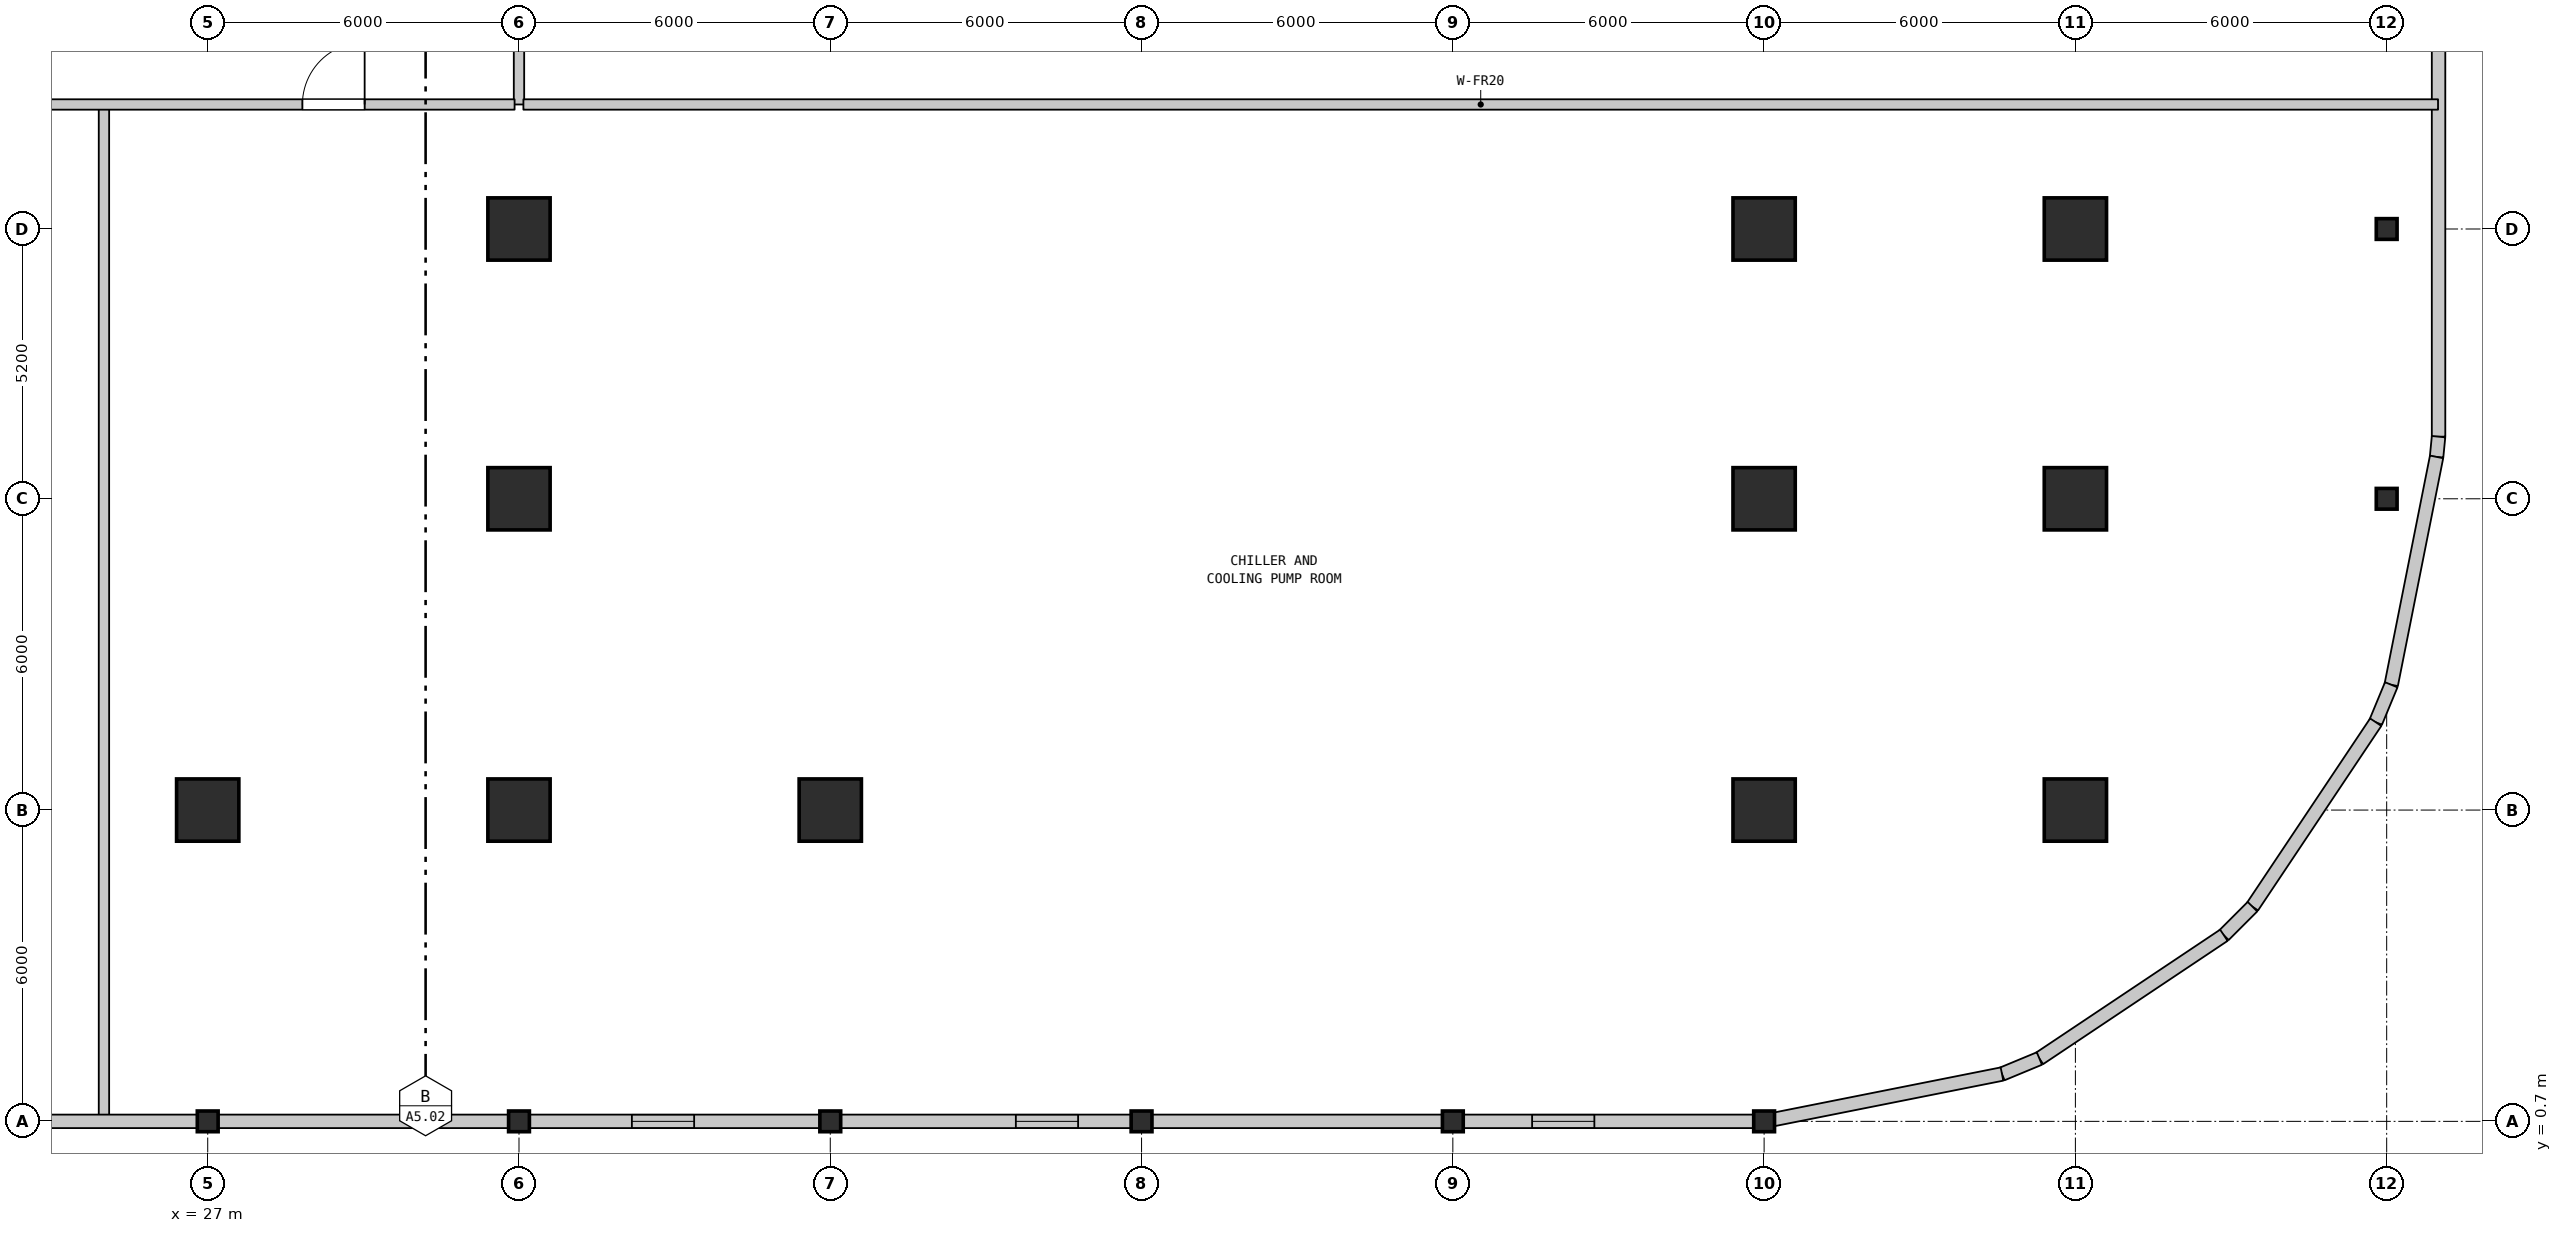
"""IFC4 building model, lengths in metres.
Left out: names, types, materials, properties, quantities, classifications, styles, units other than length and angle.
Written with IfcOpenShell. Run it as: python <this file> out.ifc"""

import sys

from ifc_helpers import new_model, si_unit, direction, frame, frame_2d, origin, origin_2d, place, context, subcontext, project, spatial, rectangle, i_section, extrude, element, fill, save


model = new_model("IFC4")
c1 = context("Model", 3, precision=1e-05, world=origin(), true_north=direction((0.0, 1.0)))
c2 = subcontext(c1, "Body", "Model", "MODEL_VIEW")
j1 = project(units=[si_unit("LENGTHUNIT", "METRE"), si_unit("PLANEANGLEUNIT", "RADIAN")], contexts=[c1])
p1 = place(None, origin())
s1 = spatial("IfcSite", under=j1, at=p1, CompositionType="ELEMENT")
p2 = place(p1, origin())
s2 = spatial("IfcBuilding", under=s1, at=p2, CompositionType="ELEMENT")
p3 = place(p2, frame((0.0, 0.0, 61.0)))
s3 = spatial("IfcBuildingStorey", under=s2, at=p3, CompositionType="ELEMENT", Elevation=61.0)
p4 = place(p3, frame((27.0, 0.7, 0.0), z_axis=(0.0, 0.0, 1.0), x_axis=(1.0, 0.0, 0.0)))
e1 = element("IfcColumn", 1, at=p4, inside=s3, PredefinedType="COLUMN", context=c2, shape_type="SweptSolid", body=[
    extrude(i_section(OverallWidth=0.401, OverallDepth=0.399, WebThickness=0.025, FlangeThickness=0.04, FilletRadius=0.015, at=origin_2d()), origin(), (0.0, 0.0, 1.0), 4.6),
])
p5 = place(p3, frame((27.0, 6.7, 0.0), z_axis=(0.0, 0.0, 1.0), x_axis=(1.0, 0.0, 0.0)))
e2 = element("IfcColumn", 2, at=p5, inside=s3, PredefinedType="COLUMN", context=c2, shape_type="SweptSolid", body=[
    extrude(rectangle(XDim=1.2, YDim=1.2, at=origin_2d()), origin(), (0.0, 0.0, 1.0), 4.6),
])
p6 = place(p3, frame((33.0, 0.7, 0.0), z_axis=(0.0, 0.0, 1.0), x_axis=(1.0, 0.0, 0.0)))
e3 = element("IfcColumn", 3, at=p6, inside=s3, PredefinedType="COLUMN", context=c2, shape_type="SweptSolid", body=[
    extrude(i_section(OverallWidth=0.401, OverallDepth=0.399, WebThickness=0.025, FlangeThickness=0.04, FilletRadius=0.015, at=origin_2d()), origin(), (0.0, 0.0, 1.0), 4.6),
])
for number, where, z_axis, x_axis in (
    (4, (33.0, 6.7, 0.0), (0.0, 0.0, 1.0), (1.0, 0.0, 0.0)),
    (5, (33.0, 12.7, 0.0), (0.0, 0.0, 1.0), (1.0, 0.0, 0.0)),
    (6, (33.0, 17.9, 0.0), (0.0, 0.0, 1.0), (1.0, 0.0, 0.0)),
):
    element("IfcColumn", number, at=place(p3, frame(where, z_axis=z_axis, x_axis=x_axis)), inside=s3, PredefinedType="COLUMN", context=c2, shape_type="SweptSolid", body=[
        extrude(rectangle(XDim=1.2, YDim=1.2, at=origin_2d()), origin(), (0.0, 0.0, 1.0), 4.6),
    ])
p7 = place(p3, frame((39.0, 0.7, 0.0), z_axis=(0.0, 0.0, 1.0), x_axis=(1.0, 0.0, 0.0)))
e7 = element("IfcColumn", 7, at=p7, inside=s3, PredefinedType="COLUMN", context=c2, shape_type="SweptSolid", body=[
    extrude(i_section(OverallWidth=0.401, OverallDepth=0.399, WebThickness=0.025, FlangeThickness=0.04, FilletRadius=0.015, at=origin_2d()), origin(), (0.0, 0.0, 1.0), 4.6),
])
p8 = place(p3, frame((39.0, 6.7, 0.0), z_axis=(0.0, 0.0, 1.0), x_axis=(1.0, 0.0, 0.0)))
e8 = element("IfcColumn", 8, at=p8, inside=s3, PredefinedType="COLUMN", context=c2, shape_type="SweptSolid", body=[
    extrude(rectangle(XDim=1.2, YDim=1.2, at=origin_2d()), origin(), (0.0, 0.0, 1.0), 4.6),
])
for number, where, z_axis, x_axis in (
    (9, (45.0, 0.7, 0.0), (0.0, 0.0, 1.0), (1.0, 0.0, 0.0)),
    (10, (51.0, 0.7, 0.0), (0.0, 0.0, 1.0), (1.0, 0.0, 0.0)),
    (11, (57.0, 0.7, 0.0), (0.0, 0.0, 1.0), (1.0, 0.0, 0.0)),
):
    element("IfcColumn", number, at=place(p3, frame(where, z_axis=z_axis, x_axis=x_axis)), inside=s3, PredefinedType="COLUMN", context=c2, shape_type="SweptSolid", body=[
        extrude(i_section(OverallWidth=0.401, OverallDepth=0.399, WebThickness=0.025, FlangeThickness=0.04, FilletRadius=0.015, at=origin_2d()), origin(), (0.0, 0.0, 1.0), 4.6),
    ])
for number, where, z_axis, x_axis in (
    (12, (57.0, 6.7, 0.0), (0.0, 0.0, 1.0), (1.0, 0.0, 0.0)),
    (13, (57.0, 12.7, 0.0), (0.0, 0.0, 1.0), (1.0, 0.0, 0.0)),
    (14, (57.0, 17.9, 0.0), (0.0, 0.0, 1.0), (1.0, 0.0, 0.0)),
    (15, (63.0, 6.7, 0.0), (0.0, 0.0, 1.0), (1.0, 0.0, 0.0)),
    (16, (63.0, 12.7, 0.0), (0.0, 0.0, 1.0), (1.0, 0.0, 0.0)),
    (17, (63.0, 17.9, 0.0), (0.0, 0.0, 1.0), (1.0, 0.0, 0.0)),
):
    element("IfcColumn", number, at=place(p3, frame(where, z_axis=z_axis, x_axis=x_axis)), inside=s3, PredefinedType="COLUMN", context=c2, shape_type="SweptSolid", body=[
        extrude(rectangle(XDim=1.2, YDim=1.2, at=origin_2d()), origin(), (0.0, 0.0, 1.0), 4.6),
    ])
for number, where, z_axis, x_axis in (
    (18, (69.0, 12.7, 0.0), (0.0, 0.0, 1.0), (1.0, 0.0, 0.0)),
    (19, (69.0, 17.9, 0.0), (0.0, 0.0, 1.0), (1.0, 0.0, 0.0)),
):
    element("IfcColumn", number, at=place(p3, frame(where, z_axis=z_axis, x_axis=x_axis)), inside=s3, PredefinedType="COLUMN", context=c2, shape_type="SweptSolid", body=[
        extrude(i_section(OverallWidth=0.401, OverallDepth=0.399, WebThickness=0.025, FlangeThickness=0.04, FilletRadius=0.015, at=origin_2d()), origin(), (0.0, 0.0, 1.0), 4.6),
    ])
p9 = place(p3, frame((70.0, 30.7, 0.0), z_axis=(0.0, 0.0, 1.0), x_axis=(0.0, -1.0, 0.0)))
e20 = element("IfcWall", 20, at=p9, inside=s3, PredefinedType="STANDARD", context=c2, shape_type="SweptSolid", body=[
    extrude(rectangle(XDim=16.803, YDim=0.26, at=frame_2d((8.401, 0.0))), origin(), (0.0, 0.0, 1.0), 4.28),
])
p10 = place(p9, frame((4.251, 0.0, 1.1)))
e21 = element("IfcOpeningElement", 21, at=p10, cuts=e20, PredefinedType="OPENING", context=c2, shape_type="SweptSolid", body=[
    extrude(rectangle(XDim=1.2, YDim=1.4, at=frame_2d((0.6, 0.7))), frame((0.0, 0.14, 0.0), z_axis=(0.0, -1.0, 0.0), x_axis=(1.0, 0.0, 0.0)), (0.0, 0.0, 1.0), 0.28),
])
p11 = place(p3, frame((70.0, 13.897, 0.0), z_axis=(0.0, 0.0, 1.0), x_axis=(-0.09722041859, -0.995262874928, 0.0)))
e22 = element("IfcWall", 22, at=p11, inside=s3, PredefinedType="STANDARD", context=c2, shape_type="SweptSolid", body=[
    extrude(rectangle(XDim=0.392, YDim=0.26, at=frame_2d((0.196, 0.0))), origin(), (0.0, 0.0, 1.0), 4.28),
])
p12 = place(p3, frame((69.962, 13.507, 0.0), z_axis=(0.0, 0.0, 1.0), x_axis=(-0.195172473082, -0.980768935963, 0.0)))
e23 = element("IfcWall", 23, at=p12, inside=s3, PredefinedType="STANDARD", context=c2, shape_type="SweptSolid", body=[
    extrude(rectangle(XDim=4.478, YDim=0.26, at=frame_2d((2.239, 0.0))), origin(), (0.0, 0.0, 1.0), 4.28),
])
p13 = place(p3, frame((69.088, 9.115, 0.0), z_axis=(0.0, 0.0, 1.0), x_axis=(-0.382904338353, -0.923787999311, 0.0)))
e24 = element("IfcWall", 24, at=p13, inside=s3, PredefinedType="STANDARD", context=c2, shape_type="SweptSolid", body=[
    extrude(rectangle(XDim=0.781, YDim=0.26, at=frame_2d((0.39, 0.0))), origin(), (0.0, 0.0, 1.0), 4.28),
])
p14 = place(p3, frame((68.789, 8.394, 0.0), z_axis=(0.0, 0.0, 1.0), x_axis=(-0.555543000532, -0.831487807824, 0.0)))
e25 = element("IfcWall", 25, at=p14, inside=s3, PredefinedType="STANDARD", context=c2, shape_type="SweptSolid", body=[
    extrude(rectangle(XDim=4.277, YDim=0.26, at=frame_2d((2.138, 0.0))), origin(), (0.0, 0.0, 1.0), 4.28),
])
p15 = place(p3, frame((66.413, 4.838, 0.0), z_axis=(0.0, 0.0, 1.0), x_axis=(-0.707263446027, -0.706950081629, 0.0)))
e26 = element("IfcWall", 26, at=p15, inside=s3, PredefinedType="STANDARD", context=c2, shape_type="SweptSolid", body=[
    extrude(rectangle(XDim=0.779, YDim=0.26, at=frame_2d((0.39, 0.0))), origin(), (0.0, 0.0, 1.0), 4.28),
])
p16 = place(p3, frame((65.862, 4.287, 0.0), z_axis=(0.0, 0.0, 1.0), x_axis=(-0.831461438998, -0.55558246504, 0.0)))
e27 = element("IfcWall", 27, at=p16, inside=s3, PredefinedType="STANDARD", context=c2, shape_type="SweptSolid", body=[
    extrude(rectangle(XDim=4.277, YDim=0.26, at=frame_2d((2.139, 0.0))), origin(), (0.0, 0.0, 1.0), 4.28),
])
p17 = place(p3, frame((62.306, 1.911, 0.0), z_axis=(0.0, 0.0, 1.0), x_axis=(-0.923787999311, -0.382904338353, 0.0)))
e28 = element("IfcWall", 28, at=p17, inside=s3, PredefinedType="STANDARD", context=c2, shape_type="SweptSolid", body=[
    extrude(rectangle(XDim=0.781, YDim=0.26, at=frame_2d((0.39, 0.0))), origin(), (0.0, 0.0, 1.0), 4.28),
])
p18 = place(p3, frame((61.585, 1.612, 0.0), z_axis=(0.0, 0.0, 1.0), x_axis=(-0.980766859102, -0.19518290931, 0.0)))
e29 = element("IfcWall", 29, at=p18, inside=s3, PredefinedType="STANDARD", context=c2, shape_type="SweptSolid", body=[
    extrude(rectangle(XDim=4.478, YDim=0.26, at=frame_2d((2.239, 0.0))), origin(), (0.0, 0.0, 1.0), 4.28),
])
p19 = place(p3, frame((57.193, 0.738, 0.0), z_axis=(0.0, 0.0, 1.0), x_axis=(-0.995268759893, -0.097160154282, 0.0)))
e30 = element("IfcWall", 30, at=p19, inside=s3, PredefinedType="STANDARD", context=c2, shape_type="SweptSolid", body=[
    extrude(rectangle(XDim=0.392, YDim=0.26, at=frame_2d((0.196, 0.0))), origin(), (0.0, 0.0, 1.0), 4.28),
])
p20 = place(p3, frame((56.803, 0.7, 0.0), z_axis=(0.0, 0.0, 1.0), x_axis=(-1.0, 0.0, 0.0)))
e31 = element("IfcWall", 31, at=p20, inside=s3, PredefinedType="STANDARD", context=c2, shape_type="SweptSolid", body=[
    extrude(rectangle(XDim=5.803, YDim=0.26, at=frame_2d((2.901, 0.0))), origin(), (0.0, 0.0, 1.0), 3.78),
])
p21 = place(p20, frame((3.075, 0.0, 1.1)))
e32 = element("IfcOpeningElement", 32, at=p21, cuts=e31, PredefinedType="OPENING", context=c2, shape_type="SweptSolid", body=[
    extrude(rectangle(XDim=1.2, YDim=1.4, at=frame_2d((0.6, 0.7))), frame((0.0, 0.14, 0.0), z_axis=(0.0, -1.0, 0.0), x_axis=(1.0, 0.0, 0.0)), (0.0, 0.0, 1.0), 0.28),
])
p22 = place(p3, frame((25.0, 0.71, 0.0), z_axis=(0.0, 0.0, 1.0), x_axis=(0.0, 1.0, 0.0)))
e33 = element("IfcWall", 33, at=p22, inside=s3, PredefinedType="STANDARD", context=c2, shape_type="SweptSolid", body=[
    extrude(rectangle(XDim=19.59, YDim=0.2, at=frame_2d((9.795, 0.0))), origin(), (0.0, 0.0, 1.0), 4.28),
])
p23 = place(p3, frame((33.0, 20.3, 0.0), z_axis=(0.0, 0.0, 1.0), x_axis=(0.0, 1.0, 0.0)))
e34 = element("IfcWall", 34, at=p23, inside=s3, PredefinedType="STANDARD", context=c2, shape_type="SweptSolid", body=[
    extrude(rectangle(XDim=8.2, YDim=0.2, at=frame_2d((4.1, 0.0))), origin(), (0.0, 0.0, 1.0), 3.78),
])
p24 = place(p23, frame((4.6, 0.0, 0.0)))
e35 = element("IfcOpeningElement", 35, at=p24, cuts=e34, PredefinedType="OPENING", context=c2, shape_type="SweptSolid", body=[
    extrude(rectangle(XDim=1.2, YDim=2.2, at=frame_2d((0.6, 1.1))), frame((0.0, 0.11, 0.0), z_axis=(0.0, -1.0, 0.0), x_axis=(1.0, 0.0, 0.0)), (0.0, 0.0, 1.0), 0.22),
])
p25 = place(p3, frame((12.6, 20.3, 0.0), z_axis=(0.0, 0.0, 1.0), x_axis=(1.0, 0.0, 0.0)))
e36 = element("IfcWall", 36, at=p25, inside=s3, PredefinedType="STANDARD", context=c2, shape_type="SweptSolid", body=[
    extrude(rectangle(XDim=20.315, YDim=0.2, at=frame_2d((10.157, 0.0))), origin(), (0.0, 0.0, 1.0), 4.28),
])
p26 = place(p25, frame((6.8, 0.0, 0.0)))
e37 = element("IfcOpeningElement", 37, at=p26, cuts=e36, PredefinedType="OPENING", context=c2, shape_type="SweptSolid", body=[
    extrude(rectangle(XDim=1.2, YDim=2.2, at=frame_2d((0.6, 1.1))), frame((0.0, 0.11, 0.0), z_axis=(0.0, -1.0, 0.0), x_axis=(1.0, 0.0, 0.0)), (0.0, 0.0, 1.0), 0.22),
])
p27 = place(p25, frame((16.225, 0.0, 0.0)))
e38 = element("IfcOpeningElement", 38, at=p27, cuts=e36, PredefinedType="OPENING", context=c2, shape_type="SweptSolid", body=[
    extrude(rectangle(XDim=1.2, YDim=2.2, at=frame_2d((0.6, 1.1))), frame((0.0, 0.11, 0.0), z_axis=(0.0, -1.0, 0.0), x_axis=(1.0, 0.0, 0.0)), (0.0, 0.0, 1.0), 0.22),
])
p28 = place(p3, frame((33.085, 20.3, 0.0), z_axis=(0.0, 0.0, 1.0), x_axis=(1.0, 0.0, 0.0)))
e39 = element("IfcWall", 39, at=p28, inside=s3, PredefinedType="STANDARD", context=c2, shape_type="SweptSolid", body=[
    extrude(rectangle(XDim=36.905, YDim=0.2, at=frame_2d((18.453, 0.0))), origin(), (0.0, 0.0, 1.0), 4.28),
])
p29 = place(p3, frame((51.0, 0.7, 0.0), z_axis=(0.0, 0.0, 1.0), x_axis=(-1.0, 0.0, 0.0)))
e40 = element("IfcWall", 40, at=p29, inside=s3, PredefinedType="STANDARD", context=c2, shape_type="SweptSolid", body=[
    extrude(rectangle(XDim=6.0, YDim=0.26, at=frame_2d((3.0, 0.0))), origin(), (0.0, 0.0, 1.0), 4.28),
])
p30 = place(p3, frame((45.0, 0.7, 0.0), z_axis=(0.0, 0.0, 1.0), x_axis=(-1.0, 0.0, 0.0)))
e41 = element("IfcWall", 41, at=p30, inside=s3, PredefinedType="STANDARD", context=c2, shape_type="SweptSolid", body=[
    extrude(rectangle(XDim=18.0, YDim=0.26, at=frame_2d((9.0, 0.0))), origin(), (0.0, 0.0, 1.0), 3.78),
])
p31 = place(p30, frame((1.223, 0.0, 1.1)))
e42 = element("IfcOpeningElement", 42, at=p31, cuts=e41, PredefinedType="OPENING", context=c2, shape_type="SweptSolid", body=[
    extrude(rectangle(XDim=1.2, YDim=1.4, at=frame_2d((0.6, 0.7))), frame((0.0, 0.14, 0.0), z_axis=(0.0, -1.0, 0.0), x_axis=(1.0, 0.0, 0.0)), (0.0, 0.0, 1.0), 0.28),
])
p32 = place(p30, frame((8.624, 0.0, 1.1)))
e43 = element("IfcOpeningElement", 43, at=p32, cuts=e41, PredefinedType="OPENING", context=c2, shape_type="SweptSolid", body=[
    extrude(rectangle(XDim=1.2, YDim=1.4, at=frame_2d((0.6, 0.7))), frame((0.0, 0.14, 0.0), z_axis=(0.0, -1.0, 0.0), x_axis=(1.0, 0.0, 0.0)), (0.0, 0.0, 1.0), 0.28),
])
p33 = place(p3, frame((27.0, 0.7, 0.0), z_axis=(0.0, 0.0, 1.0), x_axis=(-1.0, 0.0, 0.0)))
e44 = element("IfcWall", 44, at=p33, inside=s3, PredefinedType="STANDARD", context=c2, shape_type="SweptSolid", body=[
    extrude(rectangle(XDim=4.0, YDim=0.26, at=frame_2d((2.0, 0.0))), origin(), (0.0, 0.0, 1.0), 4.28),
])
p34 = place(p21, origin())
e45 = element("IfcWindow", 45, at=p34, inside=s3, PartitioningType="SINGLE_PANEL", PredefinedType="WINDOW", context=c2, shape_type="SweptSolid", body=[
    extrude(rectangle(XDim=1.2, YDim=1.4, at=frame_2d((0.6, 0.7))), frame((0.0, 0.03, 0.0), z_axis=(0.0, -1.0, 0.0), x_axis=(1.0, 0.0, 0.0)), (0.0, 0.0, 1.0), 0.06),
])
fill(e32, e45)
p35 = place(p31, origin())
e46 = element("IfcWindow", 46, at=p35, inside=s3, PartitioningType="SINGLE_PANEL", PredefinedType="WINDOW", context=c2, shape_type="SweptSolid", body=[
    extrude(rectangle(XDim=1.2, YDim=1.4, at=frame_2d((0.6, 0.7))), frame((0.0, 0.03, 0.0), z_axis=(0.0, -1.0, 0.0), x_axis=(1.0, 0.0, 0.0)), (0.0, 0.0, 1.0), 0.06),
])
fill(e42, e46)
p36 = place(p32, origin())
e47 = element("IfcWindow", 47, at=p36, inside=s3, PartitioningType="SINGLE_PANEL", PredefinedType="WINDOW", context=c2, shape_type="SweptSolid", body=[
    extrude(rectangle(XDim=1.2, YDim=1.4, at=frame_2d((0.6, 0.7))), frame((0.0, 0.03, 0.0), z_axis=(0.0, -1.0, 0.0), x_axis=(1.0, 0.0, 0.0)), (0.0, 0.0, 1.0), 0.06),
])
fill(e43, e47)
p37 = place(p27, origin())
e48 = element("IfcDoor", 48, at=p37, inside=s3, OperationType="SINGLE_SWING_RIGHT", PredefinedType="DOOR", context=c2, shape_type="SweptSolid", body=[
    extrude(rectangle(XDim=1.2, YDim=2.2, at=frame_2d((0.6, 1.1))), frame((0.0, 0.025, 0.0), z_axis=(0.0, -1.0, 0.0), x_axis=(1.0, 0.0, 0.0)), (0.0, 0.0, 1.0), 0.05),
])
fill(e38, e48)
save(model, sys.argv[1])
